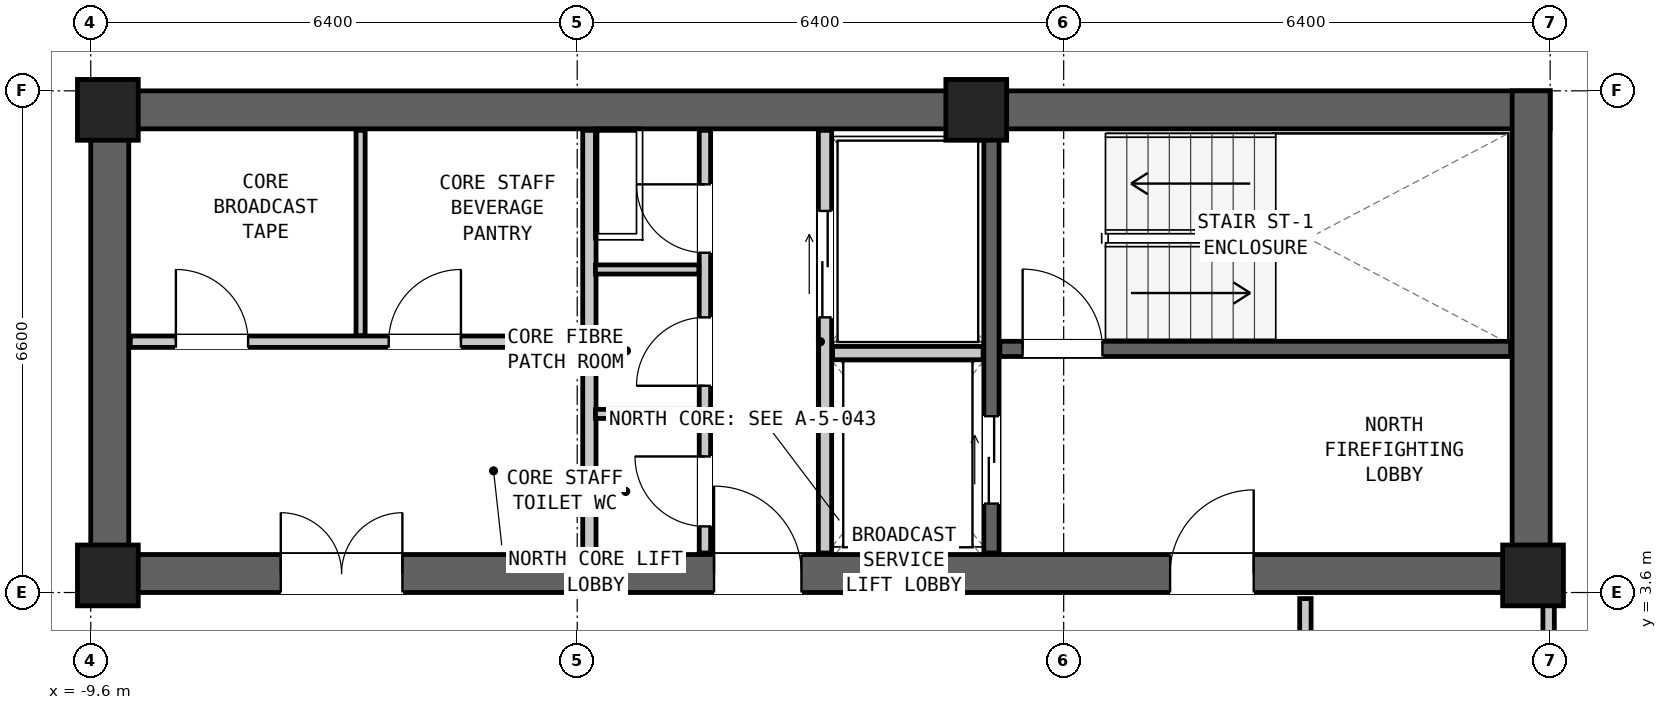
"""IFC4 building model, lengths in metres.
Left out: names, types, materials, properties, quantities, classifications, styles, units other than length and angle.
Written with IfcOpenShell. Run it as: python <this file> out.ifc"""

import sys

from ifc_helpers import new_model, si_unit, direction, frame, frame_2d, origin, origin_2d, place, context, subcontext, project, spatial, rectangle, extrude, element, fill, save


model = new_model("IFC4")
c1 = context("Model", 3, precision=1e-05, world=origin(), true_north=direction((0.0, 1.0)))
c2 = subcontext(c1, "Body", "Model", "MODEL_VIEW")
j1 = project(units=[si_unit("LENGTHUNIT", "METRE"), si_unit("PLANEANGLEUNIT", "RADIAN")], contexts=[c1])
p1 = place(None, origin())
s1 = spatial("IfcSite", under=j1, at=p1, CompositionType="ELEMENT")
p2 = place(p1, origin())
s2 = spatial("IfcBuilding", under=s1, at=p2, CompositionType="ELEMENT")
p3 = place(p2, frame((0.0, 0.0, 137.2)))
s3 = spatial("IfcBuildingStorey", under=s2, at=p3, CompositionType="ELEMENT", Elevation=137.2)
p4 = place(p3, frame((-9.6, 9.95, 0.0), z_axis=(0.0, 0.0, 1.0), x_axis=(1.0, 0.0, 0.0)))
e1 = element("IfcWall", 1, at=p4, inside=s3, PredefinedType="SHEAR", context=c2, shape_type="SweptSolid", body=[
    extrude(rectangle(XDim=19.2, YDim=0.5, at=frame_2d((9.6, 0.0))), origin(), (0.0, 0.0, 1.0), 3.05),
])
p5 = place(p3, frame((-9.6, 3.85, 0.0), z_axis=(0.0, 0.0, 1.0), x_axis=(1.0, 0.0, 0.0)))
e2 = element("IfcWall", 2, at=p5, inside=s3, PredefinedType="SHEAR", context=c2, shape_type="SweptSolid", body=[
    extrude(rectangle(XDim=19.2, YDim=0.5, at=frame_2d((9.6, 0.0))), origin(), (0.0, 0.0, 1.0), 3.05),
])
p6 = place(p5, frame((14.2, 0.0, 0.0)))
e3 = element("IfcOpeningElement", 3, at=p6, cuts=e2, PredefinedType="OPENING", context=c2, shape_type="SweptSolid", body=[
    extrude(rectangle(XDim=1.1, YDim=2.08, at=frame_2d((0.55, 1.04))), frame((0.0, 0.262, 0.0), z_axis=(0.0, -1.0, 0.0), x_axis=(1.0, 0.0, 0.0)), (0.0, 0.0, 1.0), 0.524),
])
p7 = place(p5, frame((8.2, 0.0, 0.0)))
e4 = element("IfcOpeningElement", 4, at=p7, cuts=e2, PredefinedType="OPENING", context=c2, shape_type="SweptSolid", body=[
    extrude(rectangle(XDim=1.15, YDim=2.1, at=frame_2d((0.575, 1.05))), frame((0.0, 0.262, 0.0), z_axis=(0.0, -1.0, 0.0), x_axis=(1.0, 0.0, 0.0)), (0.0, 0.0, 1.0), 0.524),
])
p8 = place(p5, frame((2.5, 0.0, 0.0)))
e5 = element("IfcOpeningElement", 5, at=p8, cuts=e2, PredefinedType="OPENING", context=c2, shape_type="SweptSolid", body=[
    extrude(rectangle(XDim=1.6, YDim=2.12, at=frame_2d((0.8, 1.06))), frame((0.0, 0.262, 0.0), z_axis=(0.0, -1.0, 0.0), x_axis=(1.0, 0.0, 0.0)), (0.0, 0.0, 1.0), 0.524),
])
for number, where, z_axis, x_axis in (
    (6, (-9.35, 3.6, 0.0), (0.0, 0.0, 1.0), (0.0, 1.0, 0.0)),
    (7, (9.35, 3.6, 0.0), (0.0, 0.0, 1.0), (0.0, 1.0, 0.0)),
):
    element("IfcWall", number, at=place(p3, frame(where, z_axis=z_axis, x_axis=x_axis)), inside=s3, PredefinedType="SHEAR", context=c2, shape_type="SweptSolid", body=[
        extrude(rectangle(XDim=6.6, YDim=0.5, at=frame_2d((3.3, 0.0))), origin(), (0.0, 0.0, 1.0), 3.05),
    ])
for number, where, z_axis, x_axis in (
    (8, (-9.375, 9.95, 0.0), (0.0, 0.0, 1.0), (1.0, 0.0, 0.0)),
    (9, (2.05, 9.95, 0.0), (0.0, 0.0, 1.0), (1.0, 0.0, 0.0)),
    (10, (-9.375, 3.825, 0.0), (0.0, 0.0, 1.0), (1.0, 0.0, 0.0)),
    (11, (9.375, 3.825, 0.0), (0.0, 0.0, 1.0), (1.0, 0.0, 0.0)),
):
    element("IfcColumn", number, at=place(p3, frame(where, z_axis=z_axis, x_axis=x_axis)), inside=s3, PredefinedType="COLUMN", context=c2, shape_type="SweptSolid", body=[
        extrude(rectangle(XDim=0.8, YDim=0.8, at=origin_2d()), origin(), (0.0, 0.0, 1.0), 3.05),
    ])
p9 = place(p3, frame((2.36, 6.805, 0.0), z_axis=(0.0, 0.0, 1.0), x_axis=(1.0, 0.0, 0.0)))
e12 = element("IfcWall", 12, at=p9, inside=s3, PredefinedType="SHEAR", context=c2, shape_type="SweptSolid", body=[
    extrude(rectangle(XDim=6.72, YDim=0.2, at=frame_2d((3.36, 0.0))), origin(), (0.0, 0.0, 1.0), 2.83),
])
p10 = place(p9, frame((0.3, 0.0, 0.0)))
e13 = element("IfcOpeningElement", 13, at=p10, cuts=e12, PredefinedType="OPENING", context=c2, shape_type="SweptSolid", body=[
    extrude(rectangle(XDim=1.05, YDim=2.08, at=frame_2d((0.525, 1.04))), frame((0.0, 0.112, 0.0), z_axis=(0.0, -1.0, 0.0), x_axis=(1.0, 0.0, 0.0)), (0.0, 0.0, 1.0), 0.224),
])
p11 = place(p3, frame((2.25, 4.12, 0.0), z_axis=(0.0, 0.0, 1.0), x_axis=(0.0, 1.0, 0.0)))
e14 = element("IfcWall", 14, at=p11, inside=s3, PredefinedType="SHEAR", context=c2, shape_type="SweptSolid", body=[
    extrude(rectangle(XDim=5.56, YDim=0.2, at=frame_2d((2.78, 0.0))), origin(), (0.0, 0.0, 1.0), 2.83),
])
p12 = place(p11, frame((0.65, 0.0, 0.0)))
e15 = element("IfcOpeningElement", 15, at=p12, cuts=e14, PredefinedType="OPENING", context=c2, shape_type="SweptSolid", body=[
    extrude(rectangle(XDim=1.15, YDim=2.08, at=frame_2d((0.575, 1.04))), frame((0.0, 0.112, 0.0), z_axis=(0.0, -1.0, 0.0), x_axis=(1.0, 0.0, 0.0)), (0.0, 0.0, 1.0), 0.224),
])
p13 = place(p3, frame((0.06, 4.12, 0.0), z_axis=(0.0, 0.0, 1.0), x_axis=(0.0, 1.0, 0.0)))
e16 = element("IfcWall", 16, at=p13, inside=s3, PredefinedType="PARTITIONING", context=c2, shape_type="SweptSolid", body=[
    extrude(rectangle(XDim=5.56, YDim=0.175, at=frame_2d((2.78, 0.0))), origin(), (0.0, 0.0, 1.0), 2.83),
])
p14 = place(p13, frame((3.1, 0.0, 0.0)))
e17 = element("IfcOpeningElement", 17, at=p14, cuts=e16, PredefinedType="OPENING", context=c2, shape_type="SweptSolid", body=[
    extrude(rectangle(XDim=1.4, YDim=2.12, at=frame_2d((0.7, 1.06))), frame((0.0, 0.1, 0.0), z_axis=(0.0, -1.0, 0.0), x_axis=(1.0, 0.0, 0.0)), (0.0, 0.0, 1.0), 0.199),
])
p15 = place(p3, frame((0.16, 6.75, 0.0), z_axis=(0.0, 0.0, 1.0), x_axis=(1.0, 0.0, 0.0)))
e18 = element("IfcWall", 18, at=p15, inside=s3, PredefinedType="PARTITIONING", context=c2, shape_type="SweptSolid", body=[
    extrude(rectangle(XDim=1.98, YDim=0.175, at=frame_2d((0.99, 0.0))), origin(), (0.0, 0.0, 1.0), 2.83),
])
p16 = place(p3, frame((-3.04, 4.12, 0.0), z_axis=(0.0, 0.0, 1.0), x_axis=(0.0, 1.0, 0.0)))
e19 = element("IfcWall", 19, at=p16, inside=s3, PredefinedType="PARTITIONING", context=c2, shape_type="SweptSolid", body=[
    extrude(rectangle(XDim=5.56, YDim=0.175, at=frame_2d((2.78, 0.0))), origin(), (0.0, 0.0, 1.0), 2.83),
])
p17 = place(p3, frame((-1.52, 4.12, 0.0), z_axis=(0.0, 0.0, 1.0), x_axis=(0.0, 1.0, 0.0)))
e20 = element("IfcWall", 20, at=p17, inside=s3, PredefinedType="PARTITIONING", context=c2, shape_type="SweptSolid", body=[
    extrude(rectangle(XDim=5.56, YDim=0.15, at=frame_2d((2.78, 0.0))), origin(), (0.0, 0.0, 1.0), 2.83),
])
p18 = place(p17, frame((3.95, 0.0, 0.0)))
e21 = element("IfcOpeningElement", 21, at=p18, cuts=e20, PredefinedType="OPENING", context=c2, shape_type="SweptSolid", body=[
    extrude(rectangle(XDim=0.9, YDim=2.05, at=frame_2d((0.45, 1.025))), frame((0.0, 0.087, 0.0), z_axis=(0.0, -1.0, 0.0), x_axis=(1.0, 0.0, 0.0)), (0.0, 0.0, 1.0), 0.174),
])
p19 = place(p17, frame((2.2, 0.0, 0.0)))
e22 = element("IfcOpeningElement", 22, at=p19, cuts=e20, PredefinedType="OPENING", context=c2, shape_type="SweptSolid", body=[
    extrude(rectangle(XDim=0.9, YDim=2.05, at=frame_2d((0.45, 1.025))), frame((0.0, 0.087, 0.0), z_axis=(0.0, -1.0, 0.0), x_axis=(1.0, 0.0, 0.0)), (0.0, 0.0, 1.0), 0.174),
])
p20 = place(p17, frame((0.35, 0.0, 0.0)))
e23 = element("IfcOpeningElement", 23, at=p20, cuts=e20, PredefinedType="OPENING", context=c2, shape_type="SweptSolid", body=[
    extrude(rectangle(XDim=0.92, YDim=2.1, at=frame_2d((0.46, 1.05))), frame((0.0, 0.087, 0.0), z_axis=(0.0, -1.0, 0.0), x_axis=(1.0, 0.0, 0.0)), (0.0, 0.0, 1.0), 0.174),
])
for number, where, z_axis, x_axis in (
    (24, (-2.96, 5.95, 0.0), (0.0, 0.0, 1.0), (1.0, 0.0, 0.0)),
    (25, (-2.96, 7.85, 0.0), (0.0, 0.0, 1.0), (1.0, 0.0, 0.0)),
):
    element("IfcWall", number, at=place(p3, frame(where, z_axis=z_axis, x_axis=x_axis)), inside=s3, PredefinedType="PARTITIONING", context=c2, shape_type="SweptSolid", body=[
        extrude(rectangle(XDim=1.36, YDim=0.12, at=frame_2d((0.68, 0.0))), origin(), (0.0, 0.0, 1.0), 2.83),
    ])
p21 = place(p3, frame((-9.08, 6.9, 0.0), z_axis=(0.0, 0.0, 1.0), x_axis=(1.0, 0.0, 0.0)))
e26 = element("IfcWall", 26, at=p21, inside=s3, PredefinedType="PARTITIONING", context=c2, shape_type="SweptSolid", body=[
    extrude(rectangle(XDim=5.96, YDim=0.15, at=frame_2d((2.98, 0.0))), origin(), (0.0, 0.0, 1.0), 2.83),
])
p22 = place(p21, frame((0.6, 0.0, 0.0)))
e27 = element("IfcOpeningElement", 27, at=p22, cuts=e26, PredefinedType="OPENING", context=c2, shape_type="SweptSolid", body=[
    extrude(rectangle(XDim=0.95, YDim=2.1, at=frame_2d((0.475, 1.05))), frame((0.0, 0.087, 0.0), z_axis=(0.0, -1.0, 0.0), x_axis=(1.0, 0.0, 0.0)), (0.0, 0.0, 1.0), 0.174),
])
p23 = place(p21, frame((3.4, 0.0, 0.0)))
e28 = element("IfcOpeningElement", 28, at=p23, cuts=e26, PredefinedType="OPENING", context=c2, shape_type="SweptSolid", body=[
    extrude(rectangle(XDim=0.95, YDim=2.1, at=frame_2d((0.475, 1.05))), frame((0.0, 0.087, 0.0), z_axis=(0.0, -1.0, 0.0), x_axis=(1.0, 0.0, 0.0)), (0.0, 0.0, 1.0), 0.174),
])
p24 = place(p3, frame((-6.05, 6.98, 0.0), z_axis=(0.0, 0.0, 1.0), x_axis=(0.0, 1.0, 0.0)))
e29 = element("IfcWall", 29, at=p24, inside=s3, PredefinedType="PARTITIONING", context=c2, shape_type="SweptSolid", body=[
    extrude(rectangle(XDim=2.7, YDim=0.12, at=frame_2d((1.35, 0.0))), origin(), (0.0, 0.0, 1.0), 2.83),
])
p25 = place(p3, frame((6.38, -2.32, 0.0), z_axis=(0.0, 0.0, 1.0), x_axis=(0.0, 1.0, 0.0)))
e30 = element("IfcWall", 30, at=p25, inside=s3, PredefinedType="PARTITIONING", context=c2, shape_type="SweptSolid", body=[
    extrude(rectangle(XDim=5.84, YDim=0.15, at=frame_2d((2.92, 0.0))), origin(), (0.0, 0.0, 1.0), 2.198),
])
p26 = place(p3, frame((9.58, -2.32, 0.0), z_axis=(0.0, 0.0, 1.0), x_axis=(0.0, 1.0, 0.0)))
e31 = element("IfcWall", 31, at=p26, inside=s3, PredefinedType="PARTITIONING", context=c2, shape_type="SweptSolid", body=[
    extrude(rectangle(XDim=5.84, YDim=0.15, at=frame_2d((2.92, 0.0))), origin(), (0.0, 0.0, 1.0), 2.198),
])
p27 = place(p26, frame((2.445, 0.0, 0.0)))
e32 = element("IfcOpeningElement", 32, at=p27, cuts=e31, PredefinedType="OPENING", context=c2, shape_type="SweptSolid", body=[
    extrude(rectangle(XDim=0.95, YDim=2.1, at=frame_2d((0.475, 1.05))), frame((0.0, 0.087, 0.0), z_axis=(0.0, -1.0, 0.0), x_axis=(1.0, 0.0, 0.0)), (0.0, 0.0, 1.0), 0.174),
])
p28 = place(p10, origin())
e33 = element("IfcDoor", 33, at=p28, inside=s3, OperationType="SINGLE_SWING_LEFT", PredefinedType="DOOR", context=c2, shape_type="SweptSolid", body=[
    extrude(rectangle(XDim=1.05, YDim=2.08, at=frame_2d((0.525, 1.04))), frame((0.0, 0.025, 0.0), z_axis=(0.0, -1.0, 0.0), x_axis=(1.0, 0.0, 0.0)), (0.0, 0.0, 1.0), 0.05),
])
fill(e13, e33)
p29 = place(p6, origin())
e34 = element("IfcDoor", 34, at=p29, inside=s3, OperationType="SINGLE_SWING_RIGHT", PredefinedType="DOOR", context=c2, shape_type="SweptSolid", body=[
    extrude(rectangle(XDim=1.1, YDim=2.08, at=frame_2d((0.55, 1.04))), frame((0.0, 0.025, 0.0), z_axis=(0.0, -1.0, 0.0), x_axis=(1.0, 0.0, 0.0)), (0.0, 0.0, 1.0), 0.05),
])
fill(e3, e34)
p30 = place(p12, origin())
e35 = element("IfcDoor", 35, at=p30, inside=s3, OperationType="DOUBLE_DOOR_SLIDING", PredefinedType="DOOR", context=c2, shape_type="SweptSolid", body=[
    extrude(rectangle(XDim=1.15, YDim=2.08, at=frame_2d((0.575, 1.04))), frame((0.0, 0.025, 0.0), z_axis=(0.0, -1.0, 0.0), x_axis=(1.0, 0.0, 0.0)), (0.0, 0.0, 1.0), 0.05),
])
fill(e15, e35)
p31 = place(p14, origin())
e36 = element("IfcDoor", 36, at=p31, inside=s3, OperationType="DOUBLE_DOOR_SLIDING", PredefinedType="DOOR", context=c2, shape_type="SweptSolid", body=[
    extrude(rectangle(XDim=1.4, YDim=2.12, at=frame_2d((0.7, 1.06))), frame((0.0, 0.025, 0.0), z_axis=(0.0, -1.0, 0.0), x_axis=(1.0, 0.0, 0.0)), (0.0, 0.0, 1.0), 0.05),
])
fill(e17, e36)
p32 = place(p7, origin())
e37 = element("IfcDoor", 37, at=p32, inside=s3, OperationType="SINGLE_SWING_LEFT", PredefinedType="DOOR", context=c2, shape_type="SweptSolid", body=[
    extrude(rectangle(XDim=1.15, YDim=2.1, at=frame_2d((0.575, 1.05))), frame((0.0, 0.025, 0.0), z_axis=(0.0, -1.0, 0.0), x_axis=(1.0, 0.0, 0.0)), (0.0, 0.0, 1.0), 0.05),
])
fill(e4, e37)
p33 = place(p18, origin())
e38 = element("IfcDoor", 38, at=p33, inside=s3, OperationType="SINGLE_SWING_RIGHT", PredefinedType="DOOR", context=c2, shape_type="SweptSolid", body=[
    extrude(rectangle(XDim=0.9, YDim=2.05, at=frame_2d((0.45, 1.025))), frame((0.0, 0.025, 0.0), z_axis=(0.0, -1.0, 0.0), x_axis=(1.0, 0.0, 0.0)), (0.0, 0.0, 1.0), 0.05),
])
fill(e21, e38)
p34 = place(p19, origin())
e39 = element("IfcDoor", 39, at=p34, inside=s3, OperationType="SINGLE_SWING_LEFT", PredefinedType="DOOR", context=c2, shape_type="SweptSolid", body=[
    extrude(rectangle(XDim=0.9, YDim=2.05, at=frame_2d((0.45, 1.025))), frame((0.0, 0.025, 0.0), z_axis=(0.0, -1.0, 0.0), x_axis=(1.0, 0.0, 0.0)), (0.0, 0.0, 1.0), 0.05),
])
fill(e22, e39)
p35 = place(p20, origin())
e40 = element("IfcDoor", 40, at=p35, inside=s3, OperationType="SINGLE_SWING_RIGHT", PredefinedType="DOOR", context=c2, shape_type="SweptSolid", body=[
    extrude(rectangle(XDim=0.92, YDim=2.1, at=frame_2d((0.46, 1.05))), frame((0.0, 0.025, 0.0), z_axis=(0.0, -1.0, 0.0), x_axis=(1.0, 0.0, 0.0)), (0.0, 0.0, 1.0), 0.05),
])
fill(e23, e40)
p36 = place(p8, origin())
e41 = element("IfcDoor", 41, at=p36, inside=s3, OperationType="DOUBLE_DOOR_SINGLE_SWING", PredefinedType="DOOR", context=c2, shape_type="SweptSolid", body=[
    extrude(rectangle(XDim=1.6, YDim=2.12, at=frame_2d((0.8, 1.06))), frame((0.0, 0.025, 0.0), z_axis=(0.0, -1.0, 0.0), x_axis=(1.0, 0.0, 0.0)), (0.0, 0.0, 1.0), 0.05),
])
fill(e5, e41)
p37 = place(p22, origin())
e42 = element("IfcDoor", 42, at=p37, inside=s3, OperationType="SINGLE_SWING_LEFT", PredefinedType="DOOR", context=c2, shape_type="SweptSolid", body=[
    extrude(rectangle(XDim=0.95, YDim=2.1, at=frame_2d((0.475, 1.05))), frame((0.0, 0.025, 0.0), z_axis=(0.0, -1.0, 0.0), x_axis=(1.0, 0.0, 0.0)), (0.0, 0.0, 1.0), 0.05),
])
fill(e27, e42)
p38 = place(p23, origin())
e43 = element("IfcDoor", 43, at=p38, inside=s3, OperationType="SINGLE_SWING_RIGHT", PredefinedType="DOOR", context=c2, shape_type="SweptSolid", body=[
    extrude(rectangle(XDim=0.95, YDim=2.1, at=frame_2d((0.475, 1.05))), frame((0.0, 0.025, 0.0), z_axis=(0.0, -1.0, 0.0), x_axis=(1.0, 0.0, 0.0)), (0.0, 0.0, 1.0), 0.05),
])
fill(e28, e43)
save(model, sys.argv[1])
